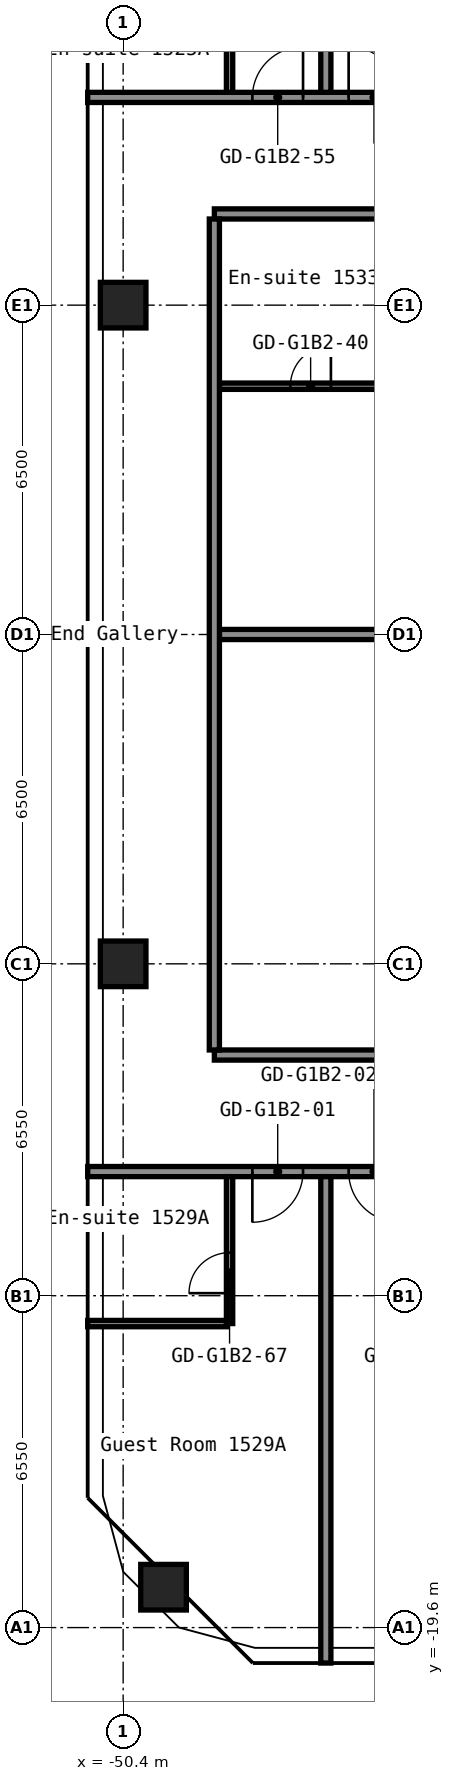
"""IFC4 building model, lengths in metres.
Left out: names, types, materials, properties, quantities, classifications, styles, units other than length and angle.
Written with IfcOpenShell. Run it as: python <this file> out.ifc"""

import sys

from ifc_helpers import new_model, si_unit, direction, frame, frame_2d, origin, origin_2d, place, context, subcontext, project, spatial, rectangle, hollow_rectangle, extrude, element, fill, save


model = new_model("IFC4")
c1 = context("Model", 3, precision=1e-05, world=origin(), true_north=direction((0.0, 1.0)))
c2 = subcontext(c1, "Body", "Model", "MODEL_VIEW")
j1 = project(units=[si_unit("LENGTHUNIT", "METRE"), si_unit("PLANEANGLEUNIT", "RADIAN")], contexts=[c1])
p1 = place(None, origin())
s1 = spatial("IfcSite", under=j1, at=p1, CompositionType="ELEMENT")
p2 = place(p1, origin())
s2 = spatial("IfcBuilding", under=s1, at=p2, CompositionType="ELEMENT")
p3 = place(p2, frame((0.0, 0.0, 55.0)))
s3 = spatial("IfcBuildingStorey", under=s2, at=p3, CompositionType="ELEMENT", Elevation=55.0)
for number, where, z_axis, x_axis in (
    (1, (-49.603, -18.803, 0.0), (0.0, 0.0, 1.0), (1.0, 0.0, 0.0)),
    (2, (-50.4, -6.5, 0.0), (0.0, 0.0, 1.0), (1.0, 0.0, 0.0)),
    (3, (-50.4, 6.5, 0.0), (0.0, 0.0, 1.0), (1.0, 0.0, 0.0)),
):
    element("IfcColumn", number, at=place(p3, frame(where, z_axis=z_axis, x_axis=x_axis)), inside=s3, PredefinedType="COLUMN", context=c2, shape_type="SweptSolid", body=[
        extrude(hollow_rectangle(XDim=0.9, YDim=0.9, WallThickness=0.036, at=origin_2d()), origin(), (0.0, 0.0, 1.0), 2.8),
    ])
p4 = place(p3, frame((-51.1, -13.6, 0.0), z_axis=(0.0, 0.0, 1.0), x_axis=(1.0, 0.0, 0.0)))
e4 = element("IfcWall", 4, at=p4, inside=s3, PredefinedType="PARTITIONING", context=c2, shape_type="SweptSolid", body=[
    extrude(rectangle(XDim=2.738, YDim=0.125, at=frame_2d((1.369, 0.0))), origin(), (0.0, 0.0, 1.0), 2.8),
])
p5 = place(p3, frame((-51.1, -10.6, 0.0), z_axis=(0.0, 0.0, 1.0), x_axis=(1.0, 0.0, 0.0)))
e5 = element("IfcWall", 5, at=p5, inside=s3, PredefinedType="PARTITIONING", context=c2, shape_type="SweptSolid", body=[
    extrude(rectangle(XDim=34.3, YDim=0.2, at=frame_2d((17.15, 0.0))), origin(), (0.0, 0.0, 1.0), 2.8),
])
p6 = place(p5, frame((3.25, 0.0, 0.0)))
e6 = element("IfcOpeningElement", 6, at=p6, cuts=e5, PredefinedType="OPENING", context=c2, shape_type="SweptSolid", body=[
    extrude(rectangle(XDim=1.0, YDim=2.1, at=frame_2d((0.5, 1.05))), frame((0.0, 0.11, 0.0), z_axis=(0.0, -1.0, 0.0), x_axis=(1.0, 0.0, 0.0)), (0.0, 0.0, 1.0), 0.22),
])
p7 = place(p5, frame((5.15, 0.0, 0.0)))
e7 = element("IfcOpeningElement", 7, at=p7, cuts=e5, PredefinedType="OPENING", context=c2, shape_type="SweptSolid", body=[
    extrude(rectangle(XDim=1.0, YDim=2.1, at=frame_2d((0.5, 1.05))), frame((0.0, 0.11, 0.0), z_axis=(0.0, -1.0, 0.0), x_axis=(1.0, 0.0, 0.0)), (0.0, 0.0, 1.0), 0.22),
])
p8 = place(p5, frame((11.95, 0.0, 0.0)))
e8 = element("IfcOpeningElement", 8, at=p8, cuts=e5, PredefinedType="OPENING", context=c2, shape_type="SweptSolid", body=[
    extrude(rectangle(XDim=1.0, YDim=2.1, at=frame_2d((0.5, 1.05))), frame((0.0, 0.11, 0.0), z_axis=(0.0, -1.0, 0.0), x_axis=(1.0, 0.0, 0.0)), (0.0, 0.0, 1.0), 0.22),
])
p9 = place(p5, frame((13.65, 0.0, 0.0)))
e9 = element("IfcOpeningElement", 9, at=p9, cuts=e5, PredefinedType="OPENING", context=c2, shape_type="SweptSolid", body=[
    extrude(rectangle(XDim=1.0, YDim=2.1, at=frame_2d((0.5, 1.05))), frame((0.0, 0.11, 0.0), z_axis=(0.0, -1.0, 0.0), x_axis=(1.0, 0.0, 0.0)), (0.0, 0.0, 1.0), 0.22),
])
p10 = place(p5, frame((20.35, 0.0, 0.0)))
e10 = element("IfcOpeningElement", 10, at=p10, cuts=e5, PredefinedType="OPENING", context=c2, shape_type="SweptSolid", body=[
    extrude(rectangle(XDim=1.0, YDim=2.1, at=frame_2d((0.5, 1.05))), frame((0.0, 0.11, 0.0), z_axis=(0.0, -1.0, 0.0), x_axis=(1.0, 0.0, 0.0)), (0.0, 0.0, 1.0), 0.22),
])
p11 = place(p5, frame((22.05, 0.0, 0.0)))
e11 = element("IfcOpeningElement", 11, at=p11, cuts=e5, PredefinedType="OPENING", context=c2, shape_type="SweptSolid", body=[
    extrude(rectangle(XDim=1.0, YDim=2.1, at=frame_2d((0.5, 1.05))), frame((0.0, 0.11, 0.0), z_axis=(0.0, -1.0, 0.0), x_axis=(1.0, 0.0, 0.0)), (0.0, 0.0, 1.0), 0.22),
])
p12 = place(p5, frame((28.75, 0.0, 0.0)))
e12 = element("IfcOpeningElement", 12, at=p12, cuts=e5, PredefinedType="OPENING", context=c2, shape_type="SweptSolid", body=[
    extrude(rectangle(XDim=1.0, YDim=2.1, at=frame_2d((0.5, 1.05))), frame((0.0, 0.11, 0.0), z_axis=(0.0, -1.0, 0.0), x_axis=(1.0, 0.0, 0.0)), (0.0, 0.0, 1.0), 0.22),
])
p13 = place(p5, frame((30.45, 0.0, 0.0)))
e13 = element("IfcOpeningElement", 13, at=p13, cuts=e5, PredefinedType="OPENING", context=c2, shape_type="SweptSolid", body=[
    extrude(rectangle(XDim=1.0, YDim=2.1, at=frame_2d((0.5, 1.05))), frame((0.0, 0.11, 0.0), z_axis=(0.0, -1.0, 0.0), x_axis=(1.0, 0.0, 0.0)), (0.0, 0.0, 1.0), 0.22),
])
p14 = place(p3, frame((-48.6, -8.3, 0.0), z_axis=(0.0, 0.0, 1.0), x_axis=(1.0, 0.0, 0.0)))
e14 = element("IfcWall", 14, at=p14, inside=s3, PredefinedType="PARTITIONING", context=c2, shape_type="SweptSolid", body=[
    extrude(rectangle(XDim=15.0, YDim=0.2, at=frame_2d((7.5, 0.0))), origin(), (0.0, 0.0, 1.0), 2.8),
])
p15 = place(p14, frame((3.85, 0.0, 0.0)))
e15 = element("IfcOpeningElement", 15, at=p15, cuts=e14, PredefinedType="OPENING", context=c2, shape_type="SweptSolid", body=[
    extrude(rectangle(XDim=1.6, YDim=2.1, at=frame_2d((0.8, 1.05))), frame((0.0, 0.11, 0.0), z_axis=(0.0, -1.0, 0.0), x_axis=(1.0, 0.0, 0.0)), (0.0, 0.0, 1.0), 0.22),
])
p16 = place(p3, frame((-48.5, 0.0, 0.0), z_axis=(0.0, 0.0, 1.0), x_axis=(1.0, 0.0, 0.0)))
e16 = element("IfcWall", 16, at=p16, inside=s3, PredefinedType="PARTITIONING", context=c2, shape_type="SweptSolid", body=[
    extrude(rectangle(XDim=14.9, YDim=0.2, at=frame_2d((7.45, 0.0))), origin(), (0.0, 0.0, 1.0), 2.8),
])
p17 = place(p3, frame((-48.5, 4.9, 0.0), z_axis=(0.0, 0.0, 1.0), x_axis=(1.0, 0.0, 0.0)))
e17 = element("IfcWall", 17, at=p17, inside=s3, PredefinedType="PARTITIONING", context=c2, shape_type="SweptSolid", body=[
    extrude(rectangle(XDim=3.637, YDim=0.125, at=frame_2d((1.819, 0.0))), origin(), (0.0, 0.0, 1.0), 2.8),
])
p18 = place(p17, frame((1.4, 0.0, 0.0)))
e18 = element("IfcOpeningElement", 18, at=p18, cuts=e17, PredefinedType="OPENING", context=c2, shape_type="SweptSolid", body=[
    extrude(rectangle(XDim=0.8, YDim=2.1, at=frame_2d((0.4, 1.05))), frame((0.0, 0.073, 0.0), z_axis=(0.0, -1.0, 0.0), x_axis=(1.0, 0.0, 0.0)), (0.0, 0.0, 1.0), 0.145),
])
p19 = place(p3, frame((-48.6, 8.3, 0.0), z_axis=(0.0, 0.0, 1.0), x_axis=(1.0, 0.0, 0.0)))
e19 = element("IfcWall", 19, at=p19, inside=s3, PredefinedType="PARTITIONING", context=c2, shape_type="SweptSolid", body=[
    extrude(rectangle(XDim=15.0, YDim=0.2, at=frame_2d((7.5, 0.0))), origin(), (0.0, 0.0, 1.0), 2.8),
])
p20 = place(p19, frame((9.55, 0.0, 0.0)))
e20 = element("IfcOpeningElement", 20, at=p20, cuts=e19, PredefinedType="OPENING", context=c2, shape_type="SweptSolid", body=[
    extrude(rectangle(XDim=1.6, YDim=2.1, at=frame_2d((0.8, 1.05))), frame((0.0, 0.11, 0.0), z_axis=(0.0, -1.0, 0.0), x_axis=(1.0, 0.0, 0.0)), (0.0, 0.0, 1.0), 0.22),
])
p21 = place(p3, frame((-51.1, 10.6, 0.0), z_axis=(0.0, 0.0, 1.0), x_axis=(1.0, 0.0, 0.0)))
e21 = element("IfcWall", 21, at=p21, inside=s3, PredefinedType="PARTITIONING", context=c2, shape_type="SweptSolid", body=[
    extrude(rectangle(XDim=34.3, YDim=0.2, at=frame_2d((17.15, 0.0))), origin(), (0.0, 0.0, 1.0), 2.8),
])
p22 = place(p21, frame((3.25, 0.0, 0.0)))
e22 = element("IfcOpeningElement", 22, at=p22, cuts=e21, PredefinedType="OPENING", context=c2, shape_type="SweptSolid", body=[
    extrude(rectangle(XDim=1.0, YDim=2.1, at=frame_2d((0.5, 1.05))), frame((0.0, 0.11, 0.0), z_axis=(0.0, -1.0, 0.0), x_axis=(1.0, 0.0, 0.0)), (0.0, 0.0, 1.0), 0.22),
])
p23 = place(p21, frame((5.15, 0.0, 0.0)))
e23 = element("IfcOpeningElement", 23, at=p23, cuts=e21, PredefinedType="OPENING", context=c2, shape_type="SweptSolid", body=[
    extrude(rectangle(XDim=1.0, YDim=2.1, at=frame_2d((0.5, 1.05))), frame((0.0, 0.11, 0.0), z_axis=(0.0, -1.0, 0.0), x_axis=(1.0, 0.0, 0.0)), (0.0, 0.0, 1.0), 0.22),
])
p24 = place(p21, frame((11.95, 0.0, 0.0)))
e24 = element("IfcOpeningElement", 24, at=p24, cuts=e21, PredefinedType="OPENING", context=c2, shape_type="SweptSolid", body=[
    extrude(rectangle(XDim=1.0, YDim=2.1, at=frame_2d((0.5, 1.05))), frame((0.0, 0.11, 0.0), z_axis=(0.0, -1.0, 0.0), x_axis=(1.0, 0.0, 0.0)), (0.0, 0.0, 1.0), 0.22),
])
p25 = place(p21, frame((13.65, 0.0, 0.0)))
e25 = element("IfcOpeningElement", 25, at=p25, cuts=e21, PredefinedType="OPENING", context=c2, shape_type="SweptSolid", body=[
    extrude(rectangle(XDim=1.0, YDim=2.1, at=frame_2d((0.5, 1.05))), frame((0.0, 0.11, 0.0), z_axis=(0.0, -1.0, 0.0), x_axis=(1.0, 0.0, 0.0)), (0.0, 0.0, 1.0), 0.22),
])
p26 = place(p21, frame((20.35, 0.0, 0.0)))
e26 = element("IfcOpeningElement", 26, at=p26, cuts=e21, PredefinedType="OPENING", context=c2, shape_type="SweptSolid", body=[
    extrude(rectangle(XDim=1.0, YDim=2.1, at=frame_2d((0.5, 1.05))), frame((0.0, 0.11, 0.0), z_axis=(0.0, -1.0, 0.0), x_axis=(1.0, 0.0, 0.0)), (0.0, 0.0, 1.0), 0.22),
])
p27 = place(p21, frame((22.05, 0.0, 0.0)))
e27 = element("IfcOpeningElement", 27, at=p27, cuts=e21, PredefinedType="OPENING", context=c2, shape_type="SweptSolid", body=[
    extrude(rectangle(XDim=1.0, YDim=2.1, at=frame_2d((0.5, 1.05))), frame((0.0, 0.11, 0.0), z_axis=(0.0, -1.0, 0.0), x_axis=(1.0, 0.0, 0.0)), (0.0, 0.0, 1.0), 0.22),
])
p28 = place(p21, frame((28.75, 0.0, 0.0)))
e28 = element("IfcOpeningElement", 28, at=p28, cuts=e21, PredefinedType="OPENING", context=c2, shape_type="SweptSolid", body=[
    extrude(rectangle(XDim=1.0, YDim=2.1, at=frame_2d((0.5, 1.05))), frame((0.0, 0.11, 0.0), z_axis=(0.0, -1.0, 0.0), x_axis=(1.0, 0.0, 0.0)), (0.0, 0.0, 1.0), 0.22),
])
p29 = place(p21, frame((30.45, 0.0, 0.0)))
e29 = element("IfcOpeningElement", 29, at=p29, cuts=e21, PredefinedType="OPENING", context=c2, shape_type="SweptSolid", body=[
    extrude(rectangle(XDim=1.0, YDim=2.1, at=frame_2d((0.5, 1.05))), frame((0.0, 0.11, 0.0), z_axis=(0.0, -1.0, 0.0), x_axis=(1.0, 0.0, 0.0)), (0.0, 0.0, 1.0), 0.22),
])
p30 = place(p3, frame((-48.6, -8.2, 0.0), z_axis=(0.0, 0.0, 1.0), x_axis=(0.0, 1.0, 0.0)))
e30 = element("IfcWall", 30, at=p30, inside=s3, PredefinedType="PARTITIONING", context=c2, shape_type="SweptSolid", body=[
    extrude(rectangle(XDim=16.4, YDim=0.2, at=frame_2d((8.2, 0.0))), origin(), (0.0, 0.0, 1.0), 2.8),
])
p31 = place(p3, frame((-48.3, -13.6, 0.0), z_axis=(0.0, 0.0, 1.0), x_axis=(0.0, 1.0, 0.0)))
e31 = element("IfcWall", 31, at=p31, inside=s3, PredefinedType="PARTITIONING", context=c2, shape_type="SweptSolid", body=[
    extrude(rectangle(XDim=2.9, YDim=0.125, at=frame_2d((1.45, 0.0))), origin(), (0.0, 0.0, 1.0), 2.8),
])
p32 = place(p31, frame((0.6, 0.0, 0.0)))
e32 = element("IfcOpeningElement", 32, at=p32, cuts=e31, PredefinedType="OPENING", context=c2, shape_type="SweptSolid", body=[
    extrude(rectangle(XDim=0.8, YDim=2.1, at=frame_2d((0.4, 1.05))), frame((0.0, 0.073, 0.0), z_axis=(0.0, -1.0, 0.0), x_axis=(1.0, 0.0, 0.0)), (0.0, 0.0, 1.0), 0.145),
])
p33 = place(p3, frame((-48.3, 10.7, 0.0), z_axis=(0.0, 0.0, 1.0), x_axis=(0.0, 1.0, 0.0)))
e33 = element("IfcWall", 33, at=p33, inside=s3, PredefinedType="PARTITIONING", context=c2, shape_type="SweptSolid", body=[
    extrude(rectangle(XDim=2.9, YDim=0.125, at=frame_2d((1.45, 0.0))), origin(), (0.0, 0.0, 1.0), 2.8),
])
p34 = place(p33, frame((1.5, 0.0, 0.0)))
e34 = element("IfcOpeningElement", 34, at=p34, cuts=e33, PredefinedType="OPENING", context=c2, shape_type="SweptSolid", body=[
    extrude(rectangle(XDim=0.8, YDim=2.1, at=frame_2d((0.4, 1.05))), frame((0.0, 0.073, 0.0), z_axis=(0.0, -1.0, 0.0), x_axis=(1.0, 0.0, 0.0)), (0.0, 0.0, 1.0), 0.145),
])
for number, where, z_axis, x_axis in (
    (35, (-46.4, -20.3, 0.0), (0.0, 0.0, 1.0), (0.0, 1.0, 0.0)),
    (36, (-46.4, 10.7, 0.0), (0.0, 0.0, 1.0), (0.0, 1.0, 0.0)),
):
    element("IfcWall", number, at=place(p3, frame(where, z_axis=z_axis, x_axis=x_axis)), inside=s3, PredefinedType="PARTITIONING", context=c2, shape_type="SweptSolid", body=[
        extrude(rectangle(XDim=9.6, YDim=0.2, at=frame_2d((4.8, 0.0))), origin(), (0.0, 0.0, 1.0), 2.8),
    ])
p35 = place(p6, origin())
e37 = element("IfcDoor", 37, at=p35, inside=s3, OperationType="SINGLE_SWING_LEFT", PredefinedType="DOOR", context=c2, shape_type="SweptSolid", body=[
    extrude(rectangle(XDim=1.0, YDim=2.1, at=frame_2d((0.5, 1.05))), frame((0.0, 0.025, 0.0), z_axis=(0.0, -1.0, 0.0), x_axis=(1.0, 0.0, 0.0)), (0.0, 0.0, 1.0), 0.05),
])
fill(e6, e37)
p36 = place(p7, origin())
e38 = element("IfcDoor", 38, at=p36, inside=s3, OperationType="SINGLE_SWING_RIGHT", PredefinedType="DOOR", context=c2, shape_type="SweptSolid", body=[
    extrude(rectangle(XDim=1.0, YDim=2.1, at=frame_2d((0.5, 1.05))), frame((0.0, 0.025, 0.0), z_axis=(0.0, -1.0, 0.0), x_axis=(1.0, 0.0, 0.0)), (0.0, 0.0, 1.0), 0.05),
])
fill(e7, e38)
p37 = place(p18, origin())
e39 = element("IfcDoor", 39, at=p37, inside=s3, OperationType="SINGLE_SWING_LEFT", PredefinedType="DOOR", context=c2, shape_type="SweptSolid", body=[
    extrude(rectangle(XDim=0.8, YDim=2.1, at=frame_2d((0.4, 1.05))), frame((0.0, 0.025, 0.0), z_axis=(0.0, -1.0, 0.0), x_axis=(1.0, 0.0, 0.0)), (0.0, 0.0, 1.0), 0.05),
])
fill(e18, e39)
p38 = place(p22, origin())
e40 = element("IfcDoor", 40, at=p38, inside=s3, OperationType="SINGLE_SWING_LEFT", PredefinedType="DOOR", context=c2, shape_type="SweptSolid", body=[
    extrude(rectangle(XDim=1.0, YDim=2.1, at=frame_2d((0.5, 1.05))), frame((0.0, 0.025, 0.0), z_axis=(0.0, -1.0, 0.0), x_axis=(1.0, 0.0, 0.0)), (0.0, 0.0, 1.0), 0.05),
])
fill(e22, e40)
p39 = place(p23, origin())
e41 = element("IfcDoor", 41, at=p39, inside=s3, OperationType="SINGLE_SWING_RIGHT", PredefinedType="DOOR", context=c2, shape_type="SweptSolid", body=[
    extrude(rectangle(XDim=1.0, YDim=2.1, at=frame_2d((0.5, 1.05))), frame((0.0, 0.025, 0.0), z_axis=(0.0, -1.0, 0.0), x_axis=(1.0, 0.0, 0.0)), (0.0, 0.0, 1.0), 0.05),
])
fill(e23, e41)
p40 = place(p32, origin())
e42 = element("IfcDoor", 42, at=p40, inside=s3, OperationType="SINGLE_SWING_RIGHT", PredefinedType="DOOR", context=c2, shape_type="SweptSolid", body=[
    extrude(rectangle(XDim=0.8, YDim=2.1, at=frame_2d((0.4, 1.05))), frame((0.0, 0.025, 0.0), z_axis=(0.0, -1.0, 0.0), x_axis=(1.0, 0.0, 0.0)), (0.0, 0.0, 1.0), 0.05),
])
fill(e32, e42)
save(model, sys.argv[1])
